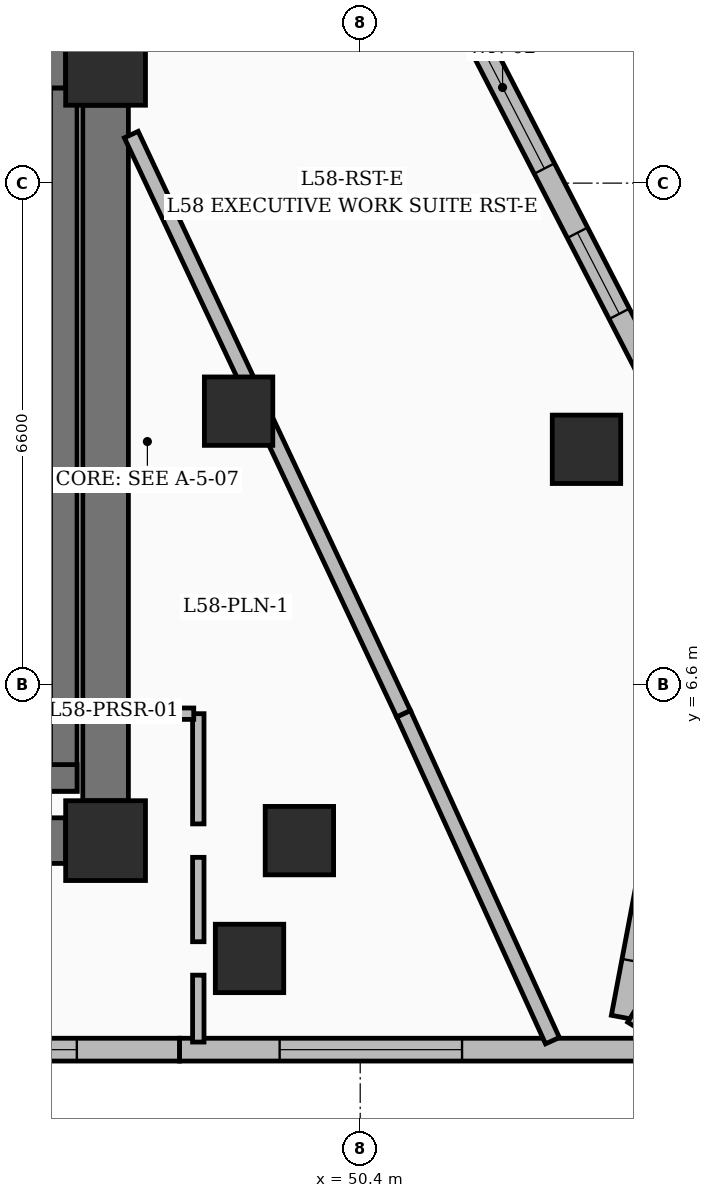
"""IFC4 building model, lengths in metres.
Left out: names, types, materials, properties, quantities, classifications, styles, units other than length and angle.
Written with IfcOpenShell. Run it as: python <this file> out.ifc"""

import sys

from ifc_helpers import new_model, si_unit, direction, frame, frame_2d, origin, origin_2d, place, context, subcontext, project, spatial, rectangle, extrude, element, fill, save


model = new_model("IFC4")
c1 = context("Model", 3, precision=1e-05, world=origin(), true_north=direction((0.0, 1.0)))
c2 = subcontext(c1, "Body", "Model", "MODEL_VIEW")
j1 = project(units=[si_unit("LENGTHUNIT", "METRE"), si_unit("PLANEANGLEUNIT", "RADIAN")], contexts=[c1])
p1 = place(None, origin())
s1 = spatial("IfcSite", under=j1, at=p1, CompositionType="ELEMENT")
p2 = place(p1, origin())
s2 = spatial("IfcBuilding", under=s1, at=p2, CompositionType="ELEMENT")
p3 = place(p2, frame((0.0, 0.0, 225.75)))
s3 = spatial("IfcBuildingStorey", under=s2, at=p3, CompositionType="ELEMENT", Elevation=225.75)
for number, where, z_axis, x_axis in (
    (1, (47.05, 4.55, 0.0), (0.0, 0.0, 1.0), (1.0, 0.0, 0.0)),
    (2, (47.05, 14.75, 0.0), (0.0, 0.0, 1.0), (1.0, 0.0, 0.0)),
):
    element("IfcColumn", number, at=place(p3, frame(where, z_axis=z_axis, x_axis=x_axis)), inside=s3, PredefinedType="COLUMN", context=c2, shape_type="SweptSolid", body=[
        extrude(rectangle(XDim=1.05, YDim=1.05, at=origin_2d()), origin(), (0.0, 0.0, 1.0), 3.75),
    ])
for number, where, z_axis, x_axis in (
    (3, (49.6, 4.55, 0.0), (0.0, 0.0, 1.0), (1.0, 0.0, 0.0)),
    (4, (48.8, 10.2, 0.0), (0.0, 0.0, 1.0), (1.0, 0.0, 0.0)),
):
    element("IfcColumn", number, at=place(p3, frame(where, z_axis=z_axis, x_axis=x_axis)), inside=s3, PredefinedType="COLUMN", context=c2, shape_type="SweptSolid", body=[
        extrude(rectangle(XDim=0.9, YDim=0.9, at=origin_2d()), origin(), (0.0, 0.0, 1.0), 3.75),
    ])
p4 = place(p3, frame((35.675, 4.55, 0.0), z_axis=(0.0, 0.0, 1.0), x_axis=(1.0, 0.0, 0.0)))
e5 = element("IfcWall", 5, at=p4, inside=s3, PredefinedType="SHEAR", context=c2, shape_type="SweptSolid", body=[
    extrude(rectangle(XDim=10.85, YDim=0.6, at=frame_2d((5.425, 0.0))), origin(), (0.0, 0.0, 1.0), 3.75),
])
p5 = place(p3, frame((35.675, 14.75, 0.0), z_axis=(0.0, 0.0, 1.0), x_axis=(1.0, 0.0, 0.0)))
e6 = element("IfcWall", 6, at=p5, inside=s3, PredefinedType="SHEAR", context=c2, shape_type="SweptSolid", body=[
    extrude(rectangle(XDim=10.85, YDim=0.6, at=frame_2d((5.425, 0.0))), origin(), (0.0, 0.0, 1.0), 3.75),
])
p6 = place(p5, frame((1.1, 0.0, 0.0)))
e7 = element("IfcOpeningElement", 7, at=p6, cuts=e6, PredefinedType="OPENING", context=c2, shape_type="SweptSolid", body=[
    extrude(rectangle(XDim=1.05, YDim=2.15, at=frame_2d((0.525, 1.075))), frame((0.0, 0.31, 0.0), z_axis=(0.0, -1.0, 0.0), x_axis=(1.0, 0.0, 0.0)), (0.0, 0.0, 1.0), 0.62),
])
p7 = place(p5, frame((8.7, 0.0, 0.0)))
e8 = element("IfcOpeningElement", 8, at=p7, cuts=e6, PredefinedType="OPENING", context=c2, shape_type="SweptSolid", body=[
    extrude(rectangle(XDim=1.05, YDim=2.15, at=frame_2d((0.525, 1.075))), frame((0.0, 0.31, 0.0), z_axis=(0.0, -1.0, 0.0), x_axis=(1.0, 0.0, 0.0)), (0.0, 0.0, 1.0), 0.62),
])
p8 = place(p5, frame((3.825, 0.0, 0.0)))
e9 = element("IfcOpeningElement", 9, at=p8, cuts=e6, PredefinedType="OPENING", context=c2, shape_type="SweptSolid", body=[
    extrude(rectangle(XDim=1.2, YDim=2.2, at=frame_2d((0.6, 1.1))), frame((0.0, 0.31, 0.0), z_axis=(0.0, -1.0, 0.0), x_axis=(1.0, 0.0, 0.0)), (0.0, 0.0, 1.0), 0.62),
])
p9 = place(p5, frame((5.825, 0.0, 0.0)))
e10 = element("IfcOpeningElement", 10, at=p9, cuts=e6, PredefinedType="OPENING", context=c2, shape_type="SweptSolid", body=[
    extrude(rectangle(XDim=1.2, YDim=2.2, at=frame_2d((0.6, 1.1))), frame((0.0, 0.31, 0.0), z_axis=(0.0, -1.0, 0.0), x_axis=(1.0, 0.0, 0.0)), (0.0, 0.0, 1.0), 0.62),
])
p10 = place(p3, frame((47.05, 5.075, 0.0), z_axis=(0.0, 0.0, 1.0), x_axis=(0.0, 1.0, 0.0)))
e11 = element("IfcWall", 11, at=p10, inside=s3, PredefinedType="SHEAR", context=c2, shape_type="SweptSolid", body=[
    extrude(rectangle(XDim=9.15, YDim=0.6, at=frame_2d((4.575, 0.0))), origin(), (0.0, 0.0, 1.0), 3.75),
])
p11 = place(p3, frame((46.5, 5.2, 0.0), z_axis=(0.0, 0.0, 1.0), x_axis=(0.0, 1.0, 0.0)))
e12 = element("IfcWall", 12, at=p11, inside=s3, PredefinedType="SOLIDWALL", context=c2, shape_type="SweptSolid", body=[
    extrude(rectangle(XDim=9.25, YDim=0.35, at=frame_2d((4.625, 0.0))), origin(), (0.0, 0.0, 1.0), 3.75),
])
p12 = place(p3, frame((43.125, 5.375, 0.0), z_axis=(0.0, 0.0, 1.0), x_axis=(1.0, 0.0, 0.0)))
e13 = element("IfcWall", 13, at=p12, inside=s3, PredefinedType="SOLIDWALL", context=c2, shape_type="SweptSolid", body=[
    extrude(rectangle(XDim=3.55, YDim=0.35, at=frame_2d((1.775, 0.0))), origin(), (0.0, 0.0, 1.0), 3.75),
])
for number, where, z_axis, x_axis in (
    (14, (48.944, 3.0, 0.0), (0.0, 0.0, 1.0), (1.0, 0.0, 0.0)),
    (15, (53.377, 9.698, 0.0), (0.0, 0.0, 1.0), (1.0, 0.0, 0.0)),
):
    element("IfcColumn", number, at=place(p3, frame(where, z_axis=z_axis, x_axis=x_axis)), inside=s3, PredefinedType="COLUMN", context=c2, shape_type="SweptSolid", body=[
        extrude(rectangle(XDim=0.9, YDim=0.9, at=origin_2d()), origin(), (0.0, 0.0, 1.0), 3.75),
    ])
p13 = place(p3, frame((51.288, 16.369, 0.0), z_axis=(0.0, 0.0, 1.0), x_axis=(0.458306446078, -0.88879424024, 0.0)))
e16 = element("IfcWall", 16, at=p13, inside=s3, PredefinedType="SOLIDWALL", context=c2, shape_type="SweptSolid", body=[
    extrude(rectangle(XDim=6.266, YDim=0.3, at=frame_2d((3.133, 0.0))), origin(), (0.0, 0.0, 1.0), 3.5),
])
p14 = place(p13, frame((4.3, 0.0, 0.8)))
e17 = element("IfcOpeningElement", 17, at=p14, cuts=e16, PredefinedType="OPENING", context=c2, shape_type="SweptSolid", body=[
    extrude(rectangle(XDim=1.2, YDim=1.8, at=frame_2d((0.6, 0.9))), frame((0.0, 0.16, 0.0), z_axis=(0.0, -1.0, 0.0), x_axis=(1.0, 0.0, 0.0)), (0.0, 0.0, 1.0), 0.32),
])
p15 = place(p13, frame((0.95, 0.0, 0.6)))
e18 = element("IfcOpeningElement", 18, at=p15, cuts=e16, PredefinedType="OPENING", context=c2, shape_type="SweptSolid", body=[
    extrude(rectangle(XDim=2.4, YDim=2.1, at=frame_2d((1.2, 1.05))), frame((0.0, 0.16, 0.0), z_axis=(0.0, -1.0, 0.0), x_axis=(1.0, 0.0, 0.0)), (0.0, 0.0, 1.0), 0.32),
])
p16 = place(p3, frame((54.263, 4.401, 0.0), z_axis=(0.0, 0.0, 1.0), x_axis=(-0.185632792315, -0.982619186876, 0.0)))
e19 = element("IfcWall", 19, at=p16, inside=s3, PredefinedType="SOLIDWALL", context=c2, shape_type="SweptSolid", body=[
    extrude(rectangle(XDim=2.215, YDim=0.3, at=frame_2d((1.107, 0.0))), origin(), (0.0, 0.0, 1.0), 3.5),
])
p17 = place(p16, frame((0.26, 0.0, 0.8)))
e20 = element("IfcOpeningElement", 20, at=p17, cuts=e19, PredefinedType="OPENING", context=c2, shape_type="SweptSolid", body=[
    extrude(rectangle(XDim=1.2, YDim=1.8, at=frame_2d((0.6, 0.9))), frame((0.0, 0.16, 0.0), z_axis=(0.0, -1.0, 0.0), x_axis=(1.0, 0.0, 0.0)), (0.0, 0.0, 1.0), 0.32),
])
p18 = place(p3, frame((53.998, 2.289, 0.0), z_axis=(0.0, 0.0, 1.0), x_axis=(0.853840299064, -0.520535055203, 0.0)))
e21 = element("IfcWall", 21, at=p18, inside=s3, PredefinedType="SOLIDWALL", context=c2, shape_type="SweptSolid", body=[
    extrude(rectangle(XDim=1.08, YDim=0.3, at=frame_2d((0.54, 0.0))), origin(), (0.0, 0.0, 1.0), 3.5),
])
p19 = place(p3, frame((54.36, 1.8, 0.0), z_axis=(0.0, 0.0, 1.0), x_axis=(-1.0, 0.0, 0.0)))
e22 = element("IfcWall", 22, at=p19, inside=s3, PredefinedType="SOLIDWALL", context=c2, shape_type="SweptSolid", body=[
    extrude(rectangle(XDim=6.338, YDim=0.3, at=frame_2d((3.169, 0.0))), origin(), (0.0, 0.0, 1.0), 3.5),
])
p20 = place(p19, frame((2.62, 0.0, 0.6)))
e23 = element("IfcOpeningElement", 23, at=p20, cuts=e22, PredefinedType="OPENING", context=c2, shape_type="SweptSolid", body=[
    extrude(rectangle(XDim=2.4, YDim=2.1, at=frame_2d((1.2, 1.05))), frame((0.0, 0.16, 0.0), z_axis=(0.0, -1.0, 0.0), x_axis=(1.0, 0.0, 0.0)), (0.0, 0.0, 1.0), 0.32),
])
p21 = place(p3, frame((48.022, 1.8, 0.0), z_axis=(0.0, 0.0, 1.0), x_axis=(-1.0, 0.0, 0.0)))
e24 = element("IfcWall", 24, at=p21, inside=s3, PredefinedType="SOLIDWALL", context=c2, shape_type="SweptSolid", body=[
    extrude(rectangle(XDim=6.918, YDim=0.3, at=frame_2d((3.459, 0.0))), origin(), (0.0, 0.0, 1.0), 3.5),
])
p22 = place(p21, frame((4.925, 0.0, 0.8)))
e25 = element("IfcOpeningElement", 25, at=p22, cuts=e24, PredefinedType="OPENING", context=c2, shape_type="SweptSolid", body=[
    extrude(rectangle(XDim=1.2, YDim=1.8, at=frame_2d((0.6, 0.9))), frame((0.0, 0.16, 0.0), z_axis=(0.0, -1.0, 0.0), x_axis=(1.0, 0.0, 0.0)), (0.0, 0.0, 1.0), 0.32),
])
p23 = place(p21, frame((1.35, 0.0, 0.55)))
e26 = element("IfcOpeningElement", 26, at=p23, cuts=e24, PredefinedType="OPENING", context=c2, shape_type="SweptSolid", body=[
    extrude(rectangle(XDim=2.1, YDim=2.4, at=frame_2d((1.05, 1.2))), frame((0.0, 0.16, 0.0), z_axis=(0.0, -1.0, 0.0), x_axis=(1.0, 0.0, 0.0)), (0.0, 0.0, 1.0), 0.32),
])
p24 = place(p3, frame((48.27, 2.78, 0.0), z_axis=(0.0, 0.0, 1.0), x_axis=(0.0, -1.0, 0.0)))
e27 = element("IfcWall", 27, at=p24, inside=s3, PredefinedType="PARTITIONING", context=c2, shape_type="SweptSolid", body=[
    extrude(rectangle(XDim=0.88, YDim=0.15, at=frame_2d((0.44, 0.0))), origin(), (0.0, 0.0, 1.0), 1.27),
])
p25 = place(p3, frame((48.27, 4.33, 0.0), z_axis=(0.0, 0.0, 1.0), x_axis=(0.0, -1.0, 0.0)))
e28 = element("IfcWall", 28, at=p25, inside=s3, PredefinedType="PARTITIONING", context=c2, shape_type="SweptSolid", body=[
    extrude(rectangle(XDim=1.11, YDim=0.15, at=frame_2d((0.555, 0.0))), origin(), (0.0, 0.0, 1.0), 1.27),
])
p26 = place(p3, frame((48.27, 6.22, 0.0), z_axis=(0.0, 0.0, 1.0), x_axis=(0.0, -1.0, 0.0)))
e29 = element("IfcWall", 29, at=p26, inside=s3, PredefinedType="PARTITIONING", context=c2, shape_type="SweptSolid", body=[
    extrude(rectangle(XDim=1.45, YDim=0.15, at=frame_2d((0.725, 0.0))), origin(), (0.0, 0.0, 1.0), 3.5),
])
p27 = place(p3, frame((52.929, 1.918, 0.0), z_axis=(0.0, 0.0, 1.0), x_axis=(-0.414421560501, 0.910085034594, 0.0)))
e30 = element("IfcWall", 30, at=p27, inside=s3, PredefinedType="PARTITIONING", context=c2, shape_type="SweptSolid", body=[
    extrude(rectangle(XDim=4.727, YDim=0.2, at=frame_2d((2.364, 0.0))), origin(), (0.0, 0.0, 1.0), 2.82),
])
p28 = place(p3, frame((47.35, 6.22, 0.0), z_axis=(0.0, 0.0, 1.0), x_axis=(1.0, 0.0, 0.0)))
e31 = element("IfcWall", 31, at=p28, inside=s3, PredefinedType="PARTITIONING", context=c2, shape_type="SweptSolid", body=[
    extrude(rectangle(XDim=0.86, YDim=0.15, at=frame_2d((0.43, 0.0))), origin(), (0.0, 0.0, 1.0), 2.685),
])
p29 = place(p3, frame((50.97, 6.22, 0.0), z_axis=(0.0, 0.0, 1.0), x_axis=(-0.425460425006, 0.904977031064, 0.0)))
e32 = element("IfcWall", 32, at=p29, inside=s3, PredefinedType="PARTITIONING", context=c2, shape_type="SweptSolid", body=[
    extrude(rectangle(XDim=8.419, YDim=0.2, at=frame_2d((4.209, 0.0))), origin(), (0.0, 0.0, 1.0), 1.27),
])
p30 = place(p14, origin())
e33 = element("IfcWindow", 33, at=p30, inside=s3, PartitioningType="SINGLE_PANEL", PredefinedType="WINDOW", context=c2, shape_type="SweptSolid", body=[
    extrude(rectangle(XDim=1.2, YDim=1.8, at=frame_2d((0.6, 0.9))), frame((0.0, 0.03, 0.0), z_axis=(0.0, -1.0, 0.0), x_axis=(1.0, 0.0, 0.0)), (0.0, 0.0, 1.0), 0.06),
])
fill(e17, e33)
p31 = place(p15, origin())
e34 = element("IfcWindow", 34, at=p31, inside=s3, PartitioningType="SINGLE_PANEL", PredefinedType="WINDOW", context=c2, shape_type="SweptSolid", body=[
    extrude(rectangle(XDim=2.4, YDim=2.1, at=frame_2d((1.2, 1.05))), frame((0.0, 0.03, 0.0), z_axis=(0.0, -1.0, 0.0), x_axis=(1.0, 0.0, 0.0)), (0.0, 0.0, 1.0), 0.06),
])
fill(e18, e34)
p32 = place(p17, origin())
e35 = element("IfcWindow", 35, at=p32, inside=s3, PartitioningType="SINGLE_PANEL", PredefinedType="WINDOW", context=c2, shape_type="SweptSolid", body=[
    extrude(rectangle(XDim=1.2, YDim=1.8, at=frame_2d((0.6, 0.9))), frame((0.0, 0.03, 0.0), z_axis=(0.0, -1.0, 0.0), x_axis=(1.0, 0.0, 0.0)), (0.0, 0.0, 1.0), 0.06),
])
fill(e20, e35)
p33 = place(p20, origin())
e36 = element("IfcWindow", 36, at=p33, inside=s3, PartitioningType="SINGLE_PANEL", PredefinedType="WINDOW", context=c2, shape_type="SweptSolid", body=[
    extrude(rectangle(XDim=2.4, YDim=2.1, at=frame_2d((1.2, 1.05))), frame((0.0, 0.03, 0.0), z_axis=(0.0, -1.0, 0.0), x_axis=(1.0, 0.0, 0.0)), (0.0, 0.0, 1.0), 0.06),
])
fill(e23, e36)
p34 = place(p23, origin())
e37 = element("IfcWindow", 37, at=p34, inside=s3, PartitioningType="SINGLE_PANEL", PredefinedType="WINDOW", context=c2, shape_type="SweptSolid", body=[
    extrude(rectangle(XDim=2.1, YDim=2.4, at=frame_2d((1.05, 1.2))), frame((0.0, 0.03, 0.0), z_axis=(0.0, -1.0, 0.0), x_axis=(1.0, 0.0, 0.0)), (0.0, 0.0, 1.0), 0.06),
])
fill(e26, e37)
save(model, sys.argv[1])
